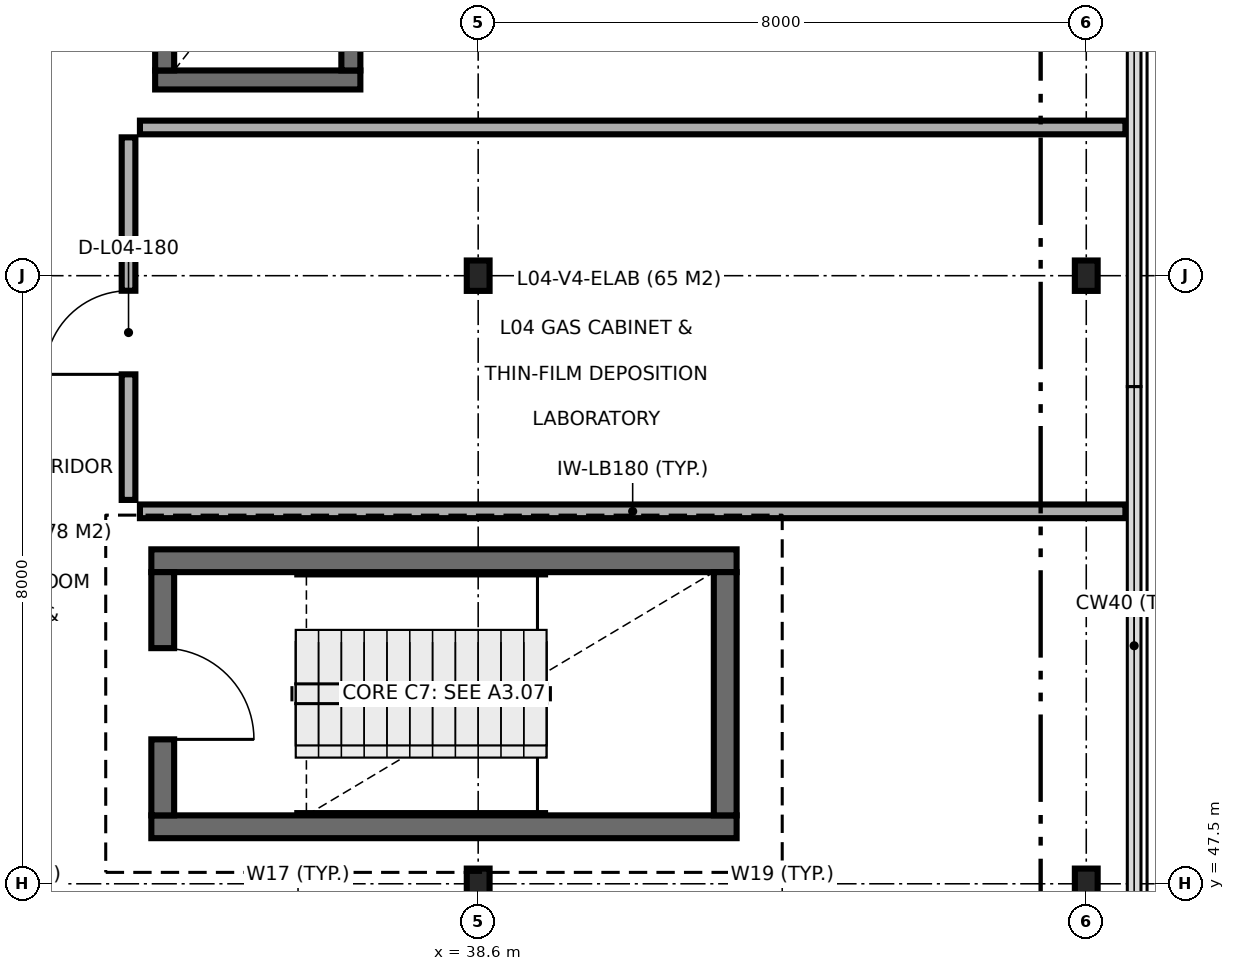
"""IFC4 building model, lengths in metres.
Left out: names, types, materials, properties, quantities, classifications, styles, units other than length and angle.
Written with IfcOpenShell. Run it as: python <this file> out.ifc"""

import sys

from ifc_helpers import new_model, si_unit, direction, frame, frame_2d, origin, origin_2d, place, context, subcontext, project, spatial, rectangle, i_section, extrude, element, fill, save


model = new_model("IFC4")
c1 = context("Model", 3, precision=1e-05, world=origin(), true_north=direction((0.0, 1.0)))
c2 = subcontext(c1, "Body", "Model", "MODEL_VIEW")
j1 = project(units=[si_unit("LENGTHUNIT", "METRE"), si_unit("PLANEANGLEUNIT", "RADIAN")], contexts=[c1])
p1 = place(None, origin())
s1 = spatial("IfcSite", under=j1, at=p1, CompositionType="ELEMENT")
p2 = place(p1, origin())
s2 = spatial("IfcBuilding", under=s1, at=p2, CompositionType="ELEMENT")
p3 = place(p2, frame((0.0, 0.0, 18.3)))
s3 = spatial("IfcBuildingStorey", under=s2, at=p3, CompositionType="ELEMENT", Elevation=18.3)
for number, where, z_axis, x_axis in (
    (1, (38.6, 47.5, 0.0), (0.0, 0.0, 1.0), (1.0, 0.0, 0.0)),
    (2, (38.6, 55.5, 0.0), (0.0, 0.0, 1.0), (1.0, 0.0, 0.0)),
    (3, (46.6, 47.5, 0.0), (0.0, 0.0, 1.0), (1.0, 0.0, 0.0)),
    (4, (46.6, 55.5, 0.0), (0.0, 0.0, 1.0), (1.0, 0.0, 0.0)),
):
    element("IfcColumn", number, at=place(p3, frame(where, z_axis=z_axis, x_axis=x_axis)), inside=s3, PredefinedType="COLUMN", context=c2, shape_type="SweptSolid", body=[
        extrude(i_section(OverallWidth=0.3, OverallDepth=0.4, WebThickness=0.013, FlangeThickness=0.024, FilletRadius=0.027, at=origin_2d()), origin(), (0.0, 0.0, 1.0), 4.5),
    ])
for number, where, z_axis, x_axis in (
    (5, (34.3, 48.25, 0.0), (0.0, 0.0, 1.0), (1.0, 0.0, 0.0)),
    (6, (42.0, 51.75, 0.0), (0.0, 0.0, 1.0), (-1.0, 0.0, 0.0)),
):
    element("IfcWall", number, at=place(p3, frame(where, z_axis=z_axis, x_axis=x_axis)), inside=s3, PredefinedType="SHEAR", context=c2, shape_type="SweptSolid", body=[
        extrude(rectangle(XDim=7.7, YDim=0.3, at=frame_2d((3.85, 0.0))), origin(), (0.0, 0.0, 1.0), 4.5),
    ])
p4 = place(p3, frame((34.45, 51.6, 0.0), z_axis=(0.0, 0.0, 1.0), x_axis=(0.0, -1.0, 0.0)))
e7 = element("IfcWall", 7, at=p4, inside=s3, PredefinedType="SHEAR", context=c2, shape_type="SweptSolid", body=[
    extrude(rectangle(XDim=3.2, YDim=0.3, at=frame_2d((1.6, 0.0))), origin(), (0.0, 0.0, 1.0), 4.5),
])
p5 = place(p4, frame((1.0, 0.0, 0.0)))
e8 = element("IfcOpeningElement", 8, at=p5, cuts=e7, PredefinedType="OPENING", context=c2, shape_type="SweptSolid", body=[
    extrude(rectangle(XDim=1.2, YDim=2.15, at=frame_2d((0.6, 1.075))), frame((0.0, 0.16, 0.0), z_axis=(0.0, -1.0, 0.0), x_axis=(1.0, 0.0, 0.0)), (0.0, 0.0, 1.0), 0.32),
])
p6 = place(p3, frame((41.85, 48.4, 0.0), z_axis=(0.0, 0.0, 1.0), x_axis=(0.0, 1.0, 0.0)))
e9 = element("IfcWall", 9, at=p6, inside=s3, PredefinedType="SHEAR", context=c2, shape_type="SweptSolid", body=[
    extrude(rectangle(XDim=3.2, YDim=0.3, at=frame_2d((1.6, 0.0))), origin(), (0.0, 0.0, 1.0), 4.5),
])
p7 = place(p3, frame((34.35, 58.075, 0.0), z_axis=(0.0, 0.0, 1.0), x_axis=(1.0, 0.0, 0.0)))
e10 = element("IfcWall", 10, at=p7, inside=s3, PredefinedType="SHEAR", context=c2, shape_type="SweptSolid", body=[
    extrude(rectangle(XDim=2.7, YDim=0.25, at=frame_2d((1.35, 0.0))), origin(), (0.0, 0.0, 1.0), 4.5),
])
p8 = place(p3, frame((34.475, 61.0, 0.0), z_axis=(0.0, 0.0, 1.0), x_axis=(0.0, -1.0, 0.0)))
e11 = element("IfcWall", 11, at=p8, inside=s3, PredefinedType="SHEAR", context=c2, shape_type="SweptSolid", body=[
    extrude(rectangle(XDim=2.8, YDim=0.25, at=frame_2d((1.4, 0.0))), origin(), (0.0, 0.0, 1.0), 4.5),
])
p9 = place(p8, frame((0.85, 0.0, 0.0)))
e12 = element("IfcOpeningElement", 12, at=p9, cuts=e11, PredefinedType="OPENING", context=c2, shape_type="SweptSolid", body=[
    extrude(rectangle(XDim=1.1, YDim=2.15, at=frame_2d((0.55, 1.075))), frame((0.0, 0.135, 0.0), z_axis=(0.0, -1.0, 0.0), x_axis=(1.0, 0.0, 0.0)), (0.0, 0.0, 1.0), 0.27),
])
p10 = place(p3, frame((36.925, 58.2, 0.0), z_axis=(0.0, 0.0, 1.0), x_axis=(0.0, 1.0, 0.0)))
e13 = element("IfcWall", 13, at=p10, inside=s3, PredefinedType="SHEAR", context=c2, shape_type="SweptSolid", body=[
    extrude(rectangle(XDim=2.8, YDim=0.25, at=frame_2d((1.4, 0.0))), origin(), (0.0, 0.0, 1.0), 4.5),
])
for number, where, z_axis, x_axis in (
    (14, (34.15, 52.4, 0.0), (0.0, 0.0, 1.0), (1.0, 0.0, 0.0)),
    (15, (34.15, 57.45, 0.0), (0.0, 0.0, 1.0), (1.0, 0.0, 0.0)),
):
    element("IfcWall", number, at=place(p3, frame(where, z_axis=z_axis, x_axis=x_axis)), inside=s3, PredefinedType="PARTITIONING", context=c2, shape_type="SweptSolid", body=[
        extrude(rectangle(XDim=12.965, YDim=0.18, at=frame_2d((6.482, 0.0))), origin(), (0.0, 0.0, 1.0), 4.28),
    ])
p11 = place(p3, frame((34.0, 52.55, 0.0), z_axis=(0.0, 0.0, 1.0), x_axis=(0.0, 1.0, 0.0)))
e16 = element("IfcWall", 16, at=p11, inside=s3, PredefinedType="PARTITIONING", context=c2, shape_type="SweptSolid", body=[
    extrude(rectangle(XDim=4.77, YDim=0.18, at=frame_2d((2.385, 0.0))), origin(), (0.0, 0.0, 1.0), 4.28),
])
p12 = place(p11, frame((1.652, 0.0, 0.0)))
e17 = element("IfcOpeningElement", 17, at=p12, cuts=e16, PredefinedType="OPENING", context=c2, shape_type="SweptSolid", body=[
    extrude(rectangle(XDim=1.1, YDim=2.15, at=frame_2d((0.55, 1.075))), frame((0.0, 0.1, 0.0), z_axis=(0.0, -1.0, 0.0), x_axis=(1.0, 0.0, 0.0)), (0.0, 0.0, 1.0), 0.2),
])
p13 = place(p5, origin())
e18 = element("IfcDoor", 18, at=p13, inside=s3, OperationType="SINGLE_SWING_RIGHT", PredefinedType="DOOR", context=c2, shape_type="SweptSolid", body=[
    extrude(rectangle(XDim=1.2, YDim=2.15, at=frame_2d((0.6, 1.075))), frame((0.0, 0.025, 0.0), z_axis=(0.0, -1.0, 0.0), x_axis=(1.0, 0.0, 0.0)), (0.0, 0.0, 1.0), 0.05),
])
fill(e8, e18)
p14 = place(p12, origin())
e19 = element("IfcDoor", 19, at=p14, inside=s3, OperationType="SINGLE_SWING_LEFT", PredefinedType="DOOR", context=c2, shape_type="SweptSolid", body=[
    extrude(rectangle(XDim=1.1, YDim=2.15, at=frame_2d((0.55, 1.075))), frame((0.0, 0.025, 0.0), z_axis=(0.0, -1.0, 0.0), x_axis=(1.0, 0.0, 0.0)), (0.0, 0.0, 1.0), 0.05),
])
fill(e17, e19)
save(model, sys.argv[1])
